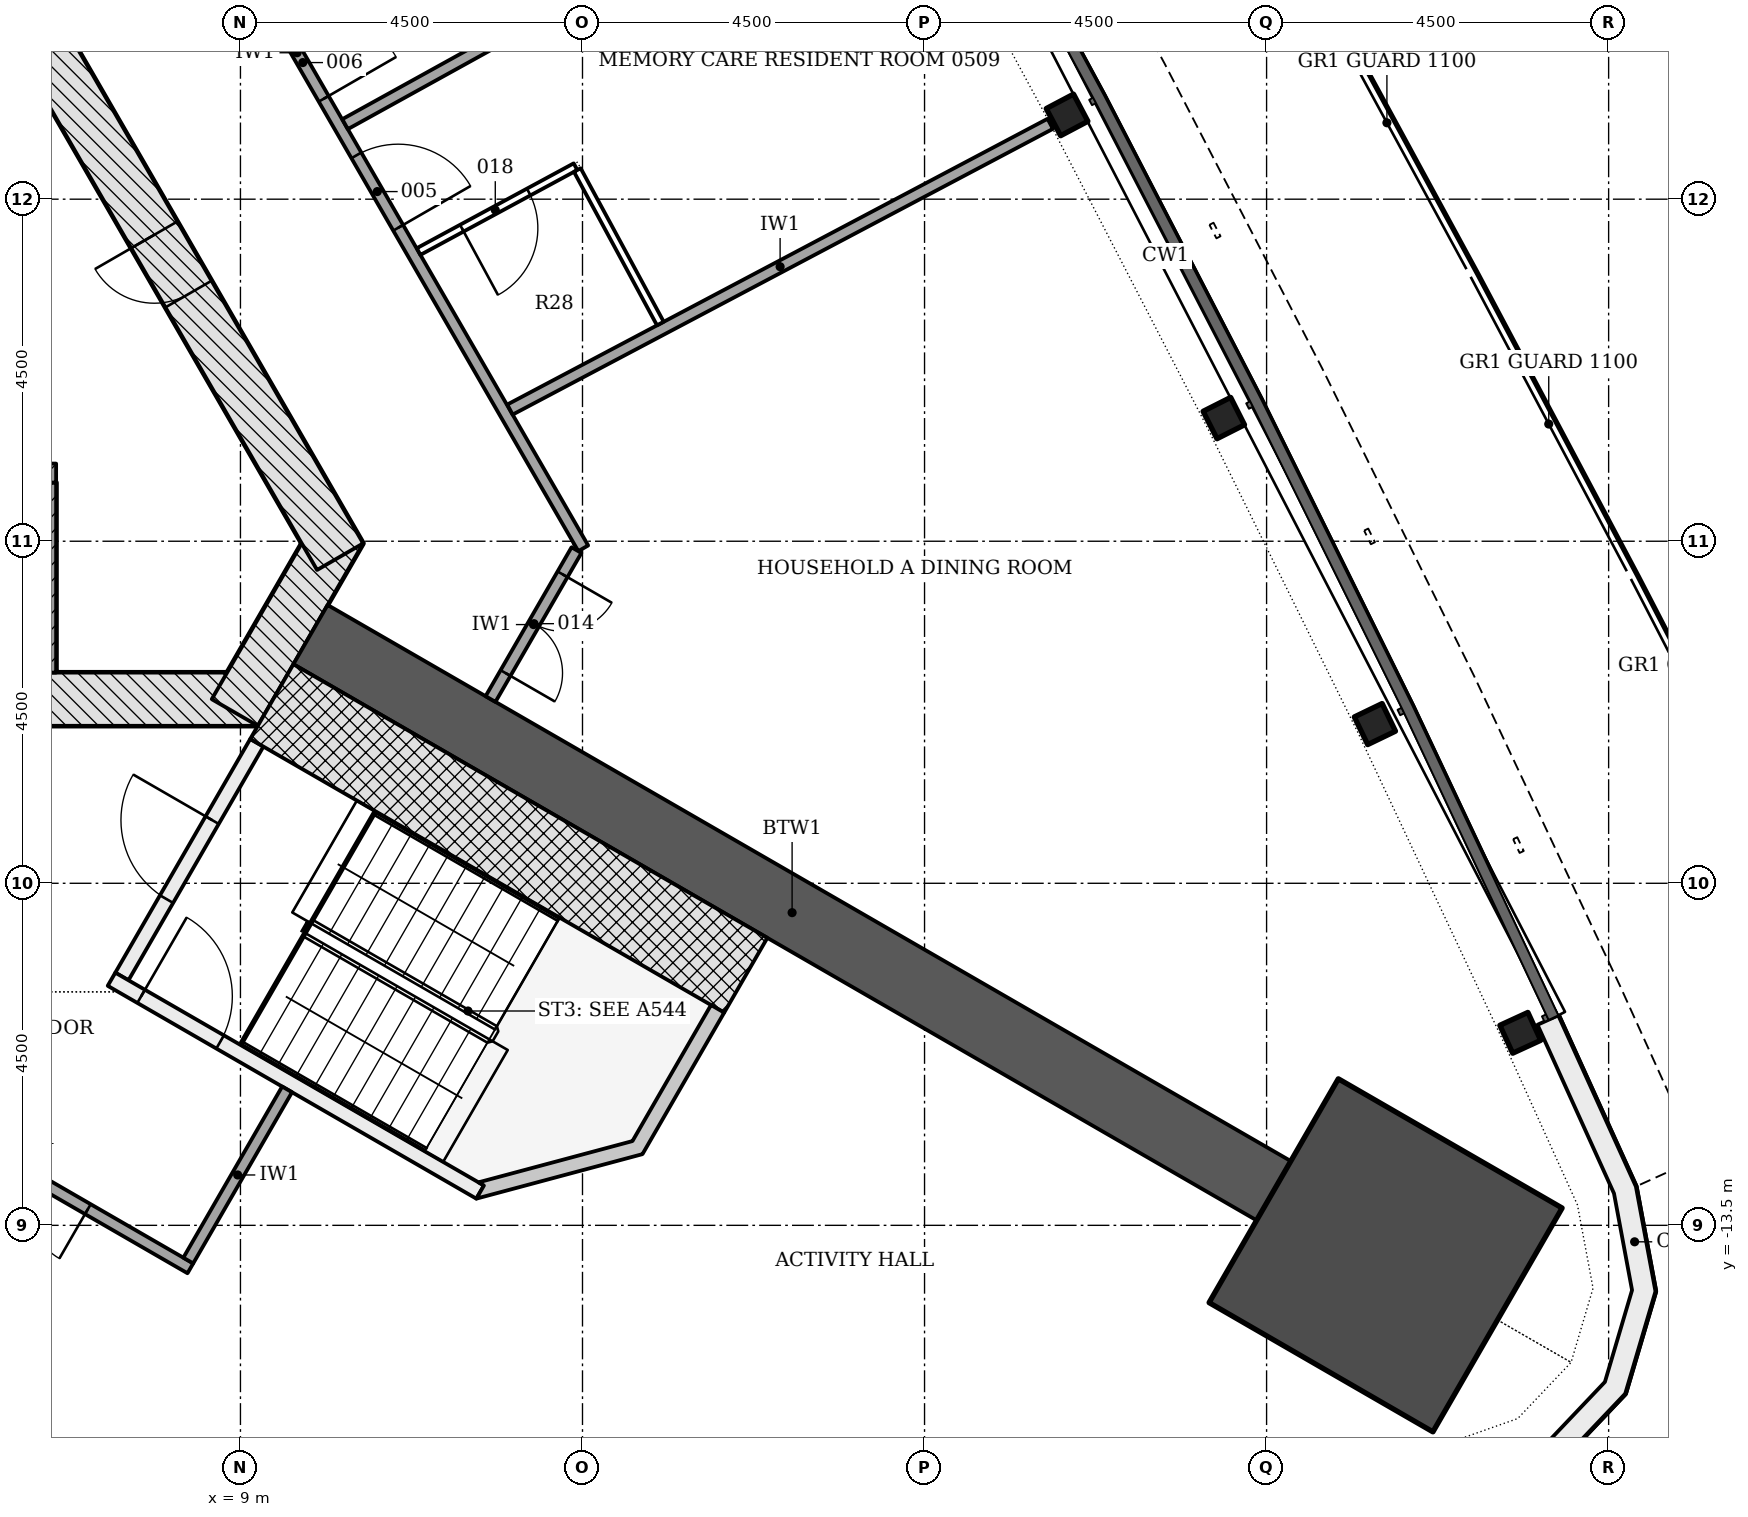
"""IFC4 building model, lengths in metres.
Left out: names, types, materials, properties, quantities, classifications, styles, units other than length and angle.
Written with IfcOpenShell. Run it as: python <this file> out.ifc"""

import sys

from ifc_helpers import new_model, si_unit, direction, frame, frame_2d, origin, origin_2d, place, context, subcontext, project, spatial, polyline, rectangle, i_section, outline, extrude, element, fill, save


model = new_model("IFC4")
c1 = context("Model", 3, precision=1e-05, world=origin(), true_north=direction((0.0, 1.0)))
c2 = subcontext(c1, "Body", "Model", "MODEL_VIEW")
j1 = project(units=[si_unit("LENGTHUNIT", "METRE"), si_unit("PLANEANGLEUNIT", "RADIAN")], contexts=[c1])
p1 = place(None, origin())
s1 = spatial("IfcSite", under=j1, at=p1, CompositionType="ELEMENT")
p2 = place(p1, origin())
s2 = spatial("IfcBuilding", under=s1, at=p2, CompositionType="ELEMENT")
p3 = place(p2, frame((0.0, 0.0, 24.0)))
s3 = spatial("IfcBuildingStorey", under=s2, at=p3, CompositionType="ELEMENT", Elevation=24.0)
p4 = place(p3, frame((-9.229, -6.578, -0.2), z_axis=(0.0, 0.0, 1.0), x_axis=(1.0, 0.0, 0.0)))
e1 = element("IfcWall", 1, at=p4, inside=s3, PredefinedType="SHEAR", context=c2, shape_type="SweptSolid", body=[
    extrude(rectangle(XDim=18.458, YDim=0.7, at=frame_2d((9.229, 0.0))), origin(), (0.0, 0.0, 1.0), 3.6),
])
p5 = place(p4, frame((3.304, 0.0, 0.2)))
e2 = element("IfcOpeningElement", 2, at=p5, cuts=e1, PredefinedType="OPENING", context=c2, shape_type="SweptSolid", body=[
    extrude(rectangle(XDim=1.1, YDim=2.1, at=frame_2d((0.55, 1.05))), frame((0.0, 0.36, 0.0), z_axis=(0.0, -1.0, 0.0), x_axis=(1.0, 0.0, 0.0)), (0.0, 0.0, 1.0), 0.72),
])
p6 = place(p4, frame((5.454, 0.0, 0.2)))
e3 = element("IfcOpeningElement", 3, at=p6, cuts=e1, PredefinedType="OPENING", context=c2, shape_type="SweptSolid", body=[
    extrude(rectangle(XDim=1.1, YDim=2.1, at=frame_2d((0.55, 1.05))), frame((0.0, 0.36, 0.0), z_axis=(0.0, -1.0, 0.0), x_axis=(1.0, 0.0, 0.0)), (0.0, 0.0, 1.0), 0.72),
])
p7 = place(p4, frame((7.604, 0.0, 0.2)))
e4 = element("IfcOpeningElement", 4, at=p7, cuts=e1, PredefinedType="OPENING", context=c2, shape_type="SweptSolid", body=[
    extrude(rectangle(XDim=1.1, YDim=2.1, at=frame_2d((0.55, 1.05))), frame((0.0, 0.36, 0.0), z_axis=(0.0, -1.0, 0.0), x_axis=(1.0, 0.0, 0.0)), (0.0, 0.0, 1.0), 0.72),
])
p8 = place(p4, frame((9.754, 0.0, 0.2)))
e5 = element("IfcOpeningElement", 5, at=p8, cuts=e1, PredefinedType="OPENING", context=c2, shape_type="SweptSolid", body=[
    extrude(rectangle(XDim=1.1, YDim=2.1, at=frame_2d((0.55, 1.05))), frame((0.0, 0.36, 0.0), z_axis=(0.0, -1.0, 0.0), x_axis=(1.0, 0.0, 0.0)), (0.0, 0.0, 1.0), 0.72),
])
p9 = place(p4, frame((11.904, 0.0, 0.2)))
e6 = element("IfcOpeningElement", 6, at=p9, cuts=e1, PredefinedType="OPENING", context=c2, shape_type="SweptSolid", body=[
    extrude(rectangle(XDim=1.1, YDim=2.1, at=frame_2d((0.55, 1.05))), frame((0.0, 0.36, 0.0), z_axis=(0.0, -1.0, 0.0), x_axis=(1.0, 0.0, 0.0)), (0.0, 0.0, 1.0), 0.72),
])
p10 = place(p4, frame((14.054, 0.0, 0.2)))
e7 = element("IfcOpeningElement", 7, at=p10, cuts=e1, PredefinedType="OPENING", context=c2, shape_type="SweptSolid", body=[
    extrude(rectangle(XDim=1.1, YDim=2.1, at=frame_2d((0.55, 1.05))), frame((0.0, 0.36, 0.0), z_axis=(0.0, -1.0, 0.0), x_axis=(1.0, 0.0, 0.0)), (0.0, 0.0, 1.0), 0.72),
])
p11 = place(p4, frame((1.079, 0.0, 0.2)))
e8 = element("IfcOpeningElement", 8, at=p11, cuts=e1, PredefinedType="OPENING", context=c2, shape_type="SweptSolid", body=[
    extrude(rectangle(XDim=0.9, YDim=2.1, at=frame_2d((0.45, 1.05))), frame((0.0, 0.36, 0.0), z_axis=(0.0, -1.0, 0.0), x_axis=(1.0, 0.0, 0.0)), (0.0, 0.0, 1.0), 0.72),
])
p12 = place(p3, frame((8.926, -6.753, -0.2), z_axis=(0.0, 0.0, 1.0), x_axis=(0.500042739161, 0.866000726912, 0.0)))
e9 = element("IfcWall", 9, at=p12, inside=s3, PredefinedType="SHEAR", context=c2, shape_type="SweptSolid", body=[
    extrude(rectangle(XDim=2.771, YDim=0.7, at=frame_2d((1.386, 0.0))), origin(), (0.0, 0.0, 1.0), 3.6),
])
p13 = place(p3, frame((10.311, -4.703, -0.2), z_axis=(0.0, 0.0, 1.0), x_axis=(-0.500001446645, 0.866024568562, 0.0)))
e10 = element("IfcWall", 10, at=p13, inside=s3, PredefinedType="SHEAR", context=c2, shape_type="SweptSolid", body=[
    extrude(rectangle(XDim=18.458, YDim=0.7, at=frame_2d((9.229, 0.0))), origin(), (0.0, 0.0, 1.0), 3.6),
])
p14 = place(p13, frame((8.7, 0.0, 0.2)))
e11 = element("IfcOpeningElement", 11, at=p14, cuts=e10, PredefinedType="OPENING", context=c2, shape_type="SweptSolid", body=[
    extrude(rectangle(XDim=1.0, YDim=2.1, at=frame_2d((0.5, 1.05))), frame((0.0, 0.36, 0.0), z_axis=(0.0, -1.0, 0.0), x_axis=(1.0, 0.0, 0.0)), (0.0, 0.0, 1.0), 0.72),
])
p15 = place(p13, frame((3.99, 0.0, 0.2)))
e12 = element("IfcOpeningElement", 12, at=p15, cuts=e10, PredefinedType="OPENING", context=c2, shape_type="SweptSolid", body=[
    extrude(rectangle(XDim=0.9, YDim=2.1, at=frame_2d((0.45, 1.05))), frame((0.0, 0.36, 0.0), z_axis=(0.0, -1.0, 0.0), x_axis=(1.0, 0.0, 0.0)), (0.0, 0.0, 1.0), 0.72),
])
p16 = place(p13, frame((13.539, 0.0, 0.2)))
e13 = element("IfcOpeningElement", 13, at=p16, cuts=e10, PredefinedType="OPENING", context=c2, shape_type="SweptSolid", body=[
    extrude(rectangle(XDim=0.9, YDim=2.1, at=frame_2d((0.45, 1.05))), frame((0.0, 0.36, 0.0), z_axis=(0.0, -1.0, 0.0), x_axis=(1.0, 0.0, 0.0)), (0.0, 0.0, 1.0), 0.72),
])
p17 = place(p3, frame((9.922, -5.728, -0.2), z_axis=(0.0, 0.0, 1.0), x_axis=(0.866028046028, -0.499995423472, 0.0)))
e14 = element("IfcWall", 14, at=p17, inside=s3, PredefinedType="SHEAR", context=c2, shape_type="SweptSolid", body=[
    extrude(rectangle(XDim=14.633, YDim=0.9, at=frame_2d((7.316, 0.0))), origin(), (0.0, 0.0, 1.0), 3.6),
])
p18 = place(p3, frame((24.066, -13.895, -0.2), z_axis=(0.0, 0.0, 1.0), x_axis=(0.866025403784, -0.5, 0.0)))
e15 = element("IfcColumn", 15, at=p18, inside=s3, PredefinedType="COLUMN", context=c2, shape_type="SweptSolid", body=[
    extrude(rectangle(XDim=3.4, YDim=3.4, at=origin_2d()), origin(), (0.0, 0.0, 1.0), 3.6),
])
for number, where, z_axis, x_axis in (
    (16, (25.838, -10.967, -0.2), (0.0, 0.0, 1.0), (-0.418, 0.909, 0.0)),
    (17, (23.925, -6.905, -0.2), (0.0, 0.0, 1.0), (-0.434, 0.901, 0.0)),
    (18, (21.937, -2.88, -0.2), (0.0, 0.0, 1.0), (-0.451, 0.893, 0.0)),
    (19, (19.875, 1.108, -0.2), (0.0, 0.0, 1.0), (-0.468, 0.884, 0.0)),
):
    element("IfcColumn", number, at=place(p3, frame(where, z_axis=z_axis, x_axis=x_axis)), inside=s3, PredefinedType="COLUMN", context=c2, shape_type="SweptSolid", body=[
        extrude(i_section(OverallWidth=0.404, OverallDepth=0.406, WebThickness=0.027, FlangeThickness=0.044, FilletRadius=0.015, at=origin_2d()), origin(), (0.0, 0.0, 1.0), 3.6),
    ])
p19 = place(p3, origin())
e20 = element("IfcWall", 20, at=p19, inside=s3, PredefinedType="NOTDEFINED", context=c2, shape_type="SweptSolid", body=[
    extrude(outline(polyline([(22.468, -17.44), (24.929, -17.199), (26.252, -16.732), (27.218, -15.715), (27.616, -14.369), (27.359, -12.99), (26.338, -10.738), (26.064, -10.861), (27.071, -13.08), (27.308, -14.353), (26.951, -15.56), (26.084, -16.473), (24.863, -16.904), (22.438, -17.142), (22.468, -17.44)])), origin(), (0.0, 0.0, 1.0), 3.3),
])
p20 = place(p3, frame((6.45, -6.228, -0.2), z_axis=(0.0, 0.0, 1.0), x_axis=(0.0, 1.0, 0.0)))
e21 = element("IfcWall", 21, at=p20, inside=s3, PredefinedType="PARTITIONING", context=c2, shape_type="SweptSolid", body=[
    extrude(rectangle(XDim=2.5, YDim=0.25, at=frame_2d((1.25, 0.0))), origin(), (0.0, 0.0, 1.0), 3.6),
])
p21 = place(p3, frame((-6.575, -3.603, 0.0), z_axis=(0.0, 0.0, 1.0), x_axis=(1.0, 0.0, 0.0)))
e22 = element("IfcWall", 22, at=p21, inside=s3, PredefinedType="PARTITIONING", context=c2, shape_type="SweptSolid", body=[
    extrude(rectangle(XDim=13.15, YDim=0.25, at=frame_2d((6.575, 0.0))), origin(), (0.0, 0.0, 1.0), 3.4),
])
p22 = place(p3, frame((7.44, -10.226, -0.2), z_axis=(0.0, 0.0, 1.0), x_axis=(0.500022077904, 0.866012656725, 0.0)))
e23 = element("IfcWall", 23, at=p22, inside=s3, PredefinedType="SHEAR", context=c2, shape_type="SweptSolid", body=[
    extrude(rectangle(XDim=3.55, YDim=0.2, at=frame_2d((1.775, 0.0))), origin(), (0.0, 0.0, 1.0), 3.6),
])
p23 = place(p22, frame((1.175, 0.0, 0.2)))
e24 = element("IfcOpeningElement", 24, at=p23, cuts=e23, PredefinedType="OPENING", context=c2, shape_type="SweptSolid", body=[
    extrude(rectangle(XDim=1.2, YDim=2.1, at=frame_2d((0.6, 1.05))), frame((0.0, 0.11, 0.0), z_axis=(0.0, -1.0, 0.0), x_axis=(1.0, 0.0, 0.0)), (0.0, 0.0, 1.0), 0.22),
])
p24 = place(p3, frame((7.304, -10.262, -0.2), z_axis=(0.0, 0.0, 1.0), x_axis=(0.866026594901, -0.49999793692, 0.0)))
e25 = element("IfcWall", 25, at=p24, inside=s3, PredefinedType="SHEAR", context=c2, shape_type="SweptSolid", body=[
    extrude(rectangle(XDim=5.6, YDim=0.2, at=frame_2d((2.8, 0.0))), origin(), (0.0, 0.0, 1.0), 3.6),
])
p25 = place(p24, frame((0.45, 0.0, 0.2)))
e26 = element("IfcOpeningElement", 26, at=p25, cuts=e25, PredefinedType="OPENING", context=c2, shape_type="SweptSolid", body=[
    extrude(rectangle(XDim=1.2, YDim=2.1, at=frame_2d((0.6, 1.05))), frame((0.0, 0.11, 0.0), z_axis=(0.0, -1.0, 0.0), x_axis=(1.0, 0.0, 0.0)), (0.0, 0.0, 1.0), 0.22),
])
p26 = place(p3, frame((9.413, -6.61, -0.2), z_axis=(0.0, 0.0, 1.0), x_axis=(0.866018442252, -0.500012057535, 0.0)))
e27 = element("IfcWall", 27, at=p26, inside=s3, PredefinedType="SHEAR", context=c2, shape_type="SweptSolid", body=[
    extrude(rectangle(XDim=7.2, YDim=1.136, at=frame_2d((3.6, 0.0))), origin(), (0.0, 0.0, 1.0), 3.6),
])
p27 = place(p3, frame((0.0, 0.0, -0.2)))
e28 = element("IfcWall", 28, at=p27, inside=s3, PredefinedType="SHEAR", context=c2, shape_type="SweptSolid", body=[
    extrude(outline(polyline([(12.104, -13.149), (14.289, -12.563), (15.364, -10.701), (15.191, -10.601), (14.157, -12.392), (12.132, -12.934), (12.204, -12.976), (12.204, -12.976), (12.204, -12.976), (12.204, -12.976), (12.204, -12.976), (12.204, -12.976), (12.204, -12.976), (12.204, -12.976), (12.204, -12.976), (12.204, -12.976), (12.204, -12.976), (12.204, -12.976), (12.204, -12.976), (12.204, -12.976), (12.204, -12.976), (12.204, -12.976), (12.204, -12.976), (12.104, -13.149)])), origin(), (0.0, 0.0, 1.0), 3.6),
])
p28 = place(p3, frame((5.981, 8.446, 0.0), z_axis=(0.0, 0.0, 1.0), x_axis=(0.499996620721, -0.866027354803, 0.0)))
e29 = element("IfcWall", 29, at=p28, inside=s3, PredefinedType="PARTITIONING", context=c2, shape_type="SweptSolid", body=[
    extrude(rectangle(XDim=15.057, YDim=0.15, at=frame_2d((7.528, 0.0))), origin(), (0.0, 0.0, 1.0), 2.768),
])
p29 = place(p28, frame((9.087, 0.0, 0.0)))
e30 = element("IfcOpeningElement", 30, at=p29, cuts=e29, PredefinedType="OPENING", context=c2, shape_type="SweptSolid", body=[
    extrude(rectangle(XDim=1.1, YDim=2.1, at=frame_2d((0.55, 1.05))), frame((0.0, 0.085, 0.0), z_axis=(0.0, -1.0, 0.0), x_axis=(1.0, 0.0, 0.0)), (0.0, 0.0, 1.0), 0.17),
])
p30 = place(p28, frame((7.128, 0.0, 0.0)))
e31 = element("IfcOpeningElement", 31, at=p30, cuts=e29, PredefinedType="OPENING", context=c2, shape_type="SweptSolid", body=[
    extrude(rectangle(XDim=1.1, YDim=2.1, at=frame_2d((0.55, 1.05))), frame((0.0, 0.085, 0.0), z_axis=(0.0, -1.0, 0.0), x_axis=(1.0, 0.0, 0.0)), (0.0, 0.0, 1.0), 0.17),
])
p31 = place(p3, frame((8.341, -14.066, 0.0), z_axis=(0.0, 0.0, 1.0), x_axis=(-0.866017493347, 0.500013701029, 0.0)))
e32 = element("IfcWall", 32, at=p31, inside=s3, PredefinedType="PARTITIONING", context=c2, shape_type="SweptSolid", body=[
    extrude(rectangle(XDim=5.95, YDim=0.15, at=frame_2d((2.975, 0.0))), origin(), (0.0, 0.0, 1.0), 2.768),
])
p32 = place(p31, frame((1.557, 0.0, 0.0)))
e33 = element("IfcOpeningElement", 33, at=p32, cuts=e32, PredefinedType="OPENING", context=c2, shape_type="SweptSolid", body=[
    extrude(rectangle(XDim=1.5, YDim=2.1, at=frame_2d((0.75, 1.05))), frame((0.0, 0.085, 0.0), z_axis=(0.0, -1.0, 0.0), x_axis=(1.0, 0.0, 0.0)), (0.0, 0.0, 1.0), 0.17),
])
p33 = place(p3, frame((8.314, -13.963, 0.0), z_axis=(0.0, 0.0, 1.0), x_axis=(0.499936506574, 0.866062058628, 0.0)))
e34 = element("IfcWall", 34, at=p33, inside=s3, PredefinedType="PARTITIONING", context=c2, shape_type="SweptSolid", body=[
    extrude(rectangle(XDim=2.6, YDim=0.15, at=frame_2d((1.3, 0.0))), origin(), (0.0, 0.0, 1.0), 2.923),
])
p34 = place(p3, frame((13.421, -4.617, 0.0), z_axis=(0.0, 0.0, 1.0), x_axis=(-0.499946688677, -0.866056180903, 0.0)))
e35 = element("IfcWall", 35, at=p34, inside=s3, PredefinedType="PARTITIONING", context=c2, shape_type="SweptSolid", body=[
    extrude(rectangle(XDim=2.262, YDim=0.15, at=frame_2d((1.131, 0.0))), origin(), (0.0, 0.0, 1.0), 3.4),
])
p35 = place(p34, frame((0.367, 0.0, 0.0)))
e36 = element("IfcOpeningElement", 36, at=p35, cuts=e35, PredefinedType="OPENING", context=c2, shape_type="SweptSolid", body=[
    extrude(rectangle(XDim=1.5, YDim=2.1, at=frame_2d((0.75, 1.05))), frame((0.0, 0.085, 0.0), z_axis=(0.0, -1.0, 0.0), x_axis=(1.0, 0.0, 0.0)), (0.0, 0.0, 1.0), 0.17),
])
p36 = place(p3, frame((17.521, 4.937, 0.0), z_axis=(0.0, 0.0, 1.0), x_axis=(-0.875148563779, -0.483854307944, 0.0)))
e37 = element("IfcWall", 37, at=p36, inside=s3, PredefinedType="PARTITIONING", context=c2, shape_type="SweptSolid", body=[
    extrude(rectangle(XDim=8.164, YDim=0.15, at=frame_2d((4.082, 0.0))), origin(), (0.0, 0.0, 1.0), 2.768),
])
p37 = place(p3, frame((19.654, 0.992, 0.0), z_axis=(0.0, 0.0, 1.0), x_axis=(-0.883980590433, -0.467523599124, 0.0)))
e38 = element("IfcWall", 38, at=p37, inside=s3, PredefinedType="PARTITIONING", context=c2, shape_type="SweptSolid", body=[
    extrude(rectangle(XDim=8.041, YDim=0.15, at=frame_2d((4.021, 0.0))), origin(), (0.0, 0.0, 1.0), 2.768),
])
p38 = place(p3, frame((13.408, 0.427, 0.0), z_axis=(0.0, 0.0, 1.0), x_axis=(-0.879611235398, -0.475693256797, 0.0)))
e39 = element("IfcWall", 39, at=p38, inside=s3, PredefinedType="PARTITIONING", context=c2, shape_type="SweptSolid", body=[
    extrude(rectangle(XDim=2.347, YDim=0.1, at=frame_2d((1.173, 0.0))), origin(), (0.0, 0.0, 1.0), 3.4),
])
p39 = place(p38, frame((0.7, 0.0, 0.0)))
e40 = element("IfcOpeningElement", 40, at=p39, cuts=e39, PredefinedType="OPENING", context=c2, shape_type="SweptSolid", body=[
    extrude(rectangle(XDim=1.0, YDim=2.1, at=frame_2d((0.5, 1.05))), frame((0.0, 0.06, 0.0), z_axis=(0.0, -1.0, 0.0), x_axis=(1.0, 0.0, 0.0)), (0.0, 0.0, 1.0), 0.12),
])
p40 = place(p3, frame((14.524, -1.636, 0.0), z_axis=(0.0, 0.0, 1.0), x_axis=(-0.475734975891, 0.879588672457, 0.0)))
e41 = element("IfcWall", 41, at=p40, inside=s3, PredefinedType="PARTITIONING", context=c2, shape_type="SweptSolid", body=[
    extrude(rectangle(XDim=2.296, YDim=0.1, at=frame_2d((1.148, 0.0))), origin(), (0.0, 0.0, 1.0), 2.768),
])
p41 = place(p15, origin())
e42 = element("IfcDoor", 42, at=p41, inside=s3, OperationType="SINGLE_SWING_RIGHT", PredefinedType="DOOR", context=c2, shape_type="SweptSolid", body=[
    extrude(rectangle(XDim=0.9, YDim=2.1, at=frame_2d((0.45, 1.05))), frame((0.0, 0.075, 0.0), z_axis=(0.0, -1.0, 0.0), x_axis=(1.0, 0.0, 0.0)), (0.0, 0.0, 1.0), 0.15),
])
fill(e12, e42)
p42 = place(p23, origin())
e43 = element("IfcDoor", 43, at=p42, inside=s3, OperationType="SINGLE_SWING_RIGHT", PredefinedType="DOOR", context=c2, shape_type="SweptSolid", body=[
    extrude(rectangle(XDim=1.2, YDim=2.1, at=frame_2d((0.6, 1.05))), frame((0.0, 0.025, 0.0), z_axis=(0.0, -1.0, 0.0), x_axis=(1.0, 0.0, 0.0)), (0.0, 0.0, 1.0), 0.05),
])
fill(e24, e43)
p43 = place(p25, origin())
e44 = element("IfcDoor", 44, at=p43, inside=s3, OperationType="SINGLE_SWING_LEFT", PredefinedType="DOOR", context=c2, shape_type="SweptSolid", body=[
    extrude(rectangle(XDim=1.2, YDim=2.1, at=frame_2d((0.6, 1.05))), frame((0.0, 0.025, 0.0), z_axis=(0.0, -1.0, 0.0), x_axis=(1.0, 0.0, 0.0)), (0.0, 0.0, 1.0), 0.05),
])
fill(e26, e44)
p44 = place(p29, origin())
e45 = element("IfcDoor", 45, at=p44, inside=s3, OperationType="SINGLE_SWING_RIGHT", PredefinedType="DOOR", context=c2, shape_type="SweptSolid", body=[
    extrude(rectangle(XDim=1.1, YDim=2.1, at=frame_2d((0.55, 1.05))), frame((0.0, 0.025, 0.0), z_axis=(0.0, -1.0, 0.0), x_axis=(1.0, 0.0, 0.0)), (0.0, 0.0, 1.0), 0.05),
])
fill(e30, e45)
p45 = place(p30, origin())
e46 = element("IfcDoor", 46, at=p45, inside=s3, OperationType="SINGLE_SWING_RIGHT", PredefinedType="DOOR", context=c2, shape_type="SweptSolid", body=[
    extrude(rectangle(XDim=1.1, YDim=2.1, at=frame_2d((0.55, 1.05))), frame((0.0, 0.025, 0.0), z_axis=(0.0, -1.0, 0.0), x_axis=(1.0, 0.0, 0.0)), (0.0, 0.0, 1.0), 0.05),
])
fill(e31, e46)
p46 = place(p32, origin())
e47 = element("IfcDoor", 47, at=p46, inside=s3, OperationType="DOUBLE_DOOR_SINGLE_SWING", PredefinedType="DOOR", context=c2, shape_type="SweptSolid", body=[
    extrude(rectangle(XDim=1.5, YDim=2.1, at=frame_2d((0.75, 1.05))), frame((0.0, 0.025, 0.0), z_axis=(0.0, -1.0, 0.0), x_axis=(1.0, 0.0, 0.0)), (0.0, 0.0, 1.0), 0.05),
])
fill(e33, e47)
p47 = place(p35, origin())
e48 = element("IfcDoor", 48, at=p47, inside=s3, OperationType="DOUBLE_DOOR_SINGLE_SWING", PredefinedType="DOOR", context=c2, shape_type="SweptSolid", body=[
    extrude(rectangle(XDim=1.5, YDim=2.1, at=frame_2d((0.75, 1.05))), frame((0.0, 0.025, 0.0), z_axis=(0.0, -1.0, 0.0), x_axis=(1.0, 0.0, 0.0)), (0.0, 0.0, 1.0), 0.05),
])
fill(e36, e48)
p48 = place(p39, origin())
e49 = element("IfcDoor", 49, at=p48, inside=s3, OperationType="SINGLE_SWING_RIGHT", PredefinedType="DOOR", context=c2, shape_type="SweptSolid", body=[
    extrude(rectangle(XDim=1.0, YDim=2.1, at=frame_2d((0.5, 1.05))), frame((0.0, 0.025, 0.0), z_axis=(0.0, -1.0, 0.0), x_axis=(1.0, 0.0, 0.0)), (0.0, 0.0, 1.0), 0.05),
])
fill(e40, e49)
save(model, sys.argv[1])
